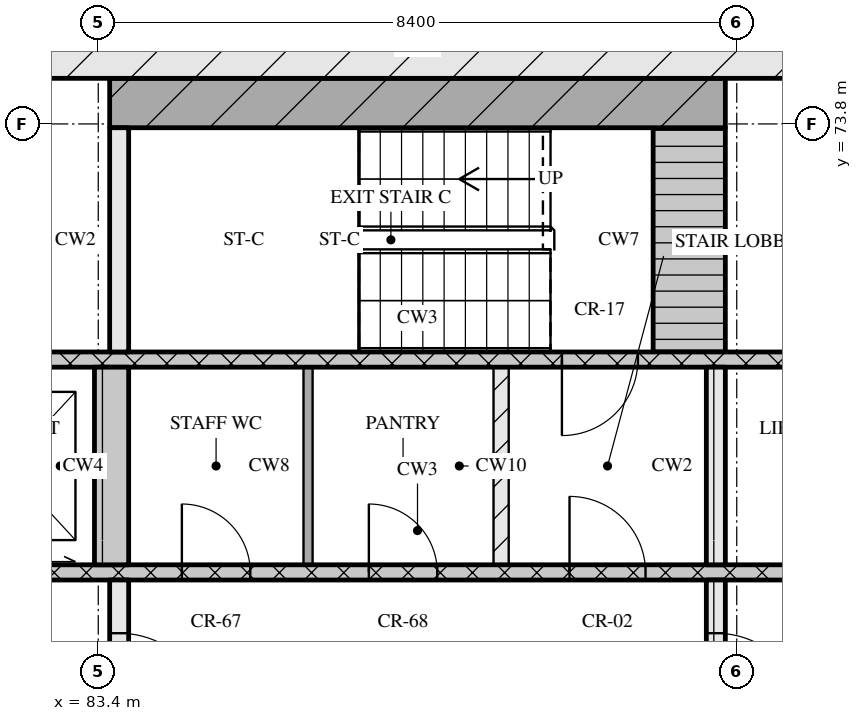
"""IFC4 building model, lengths in metres.
Left out: names, types, materials, properties, quantities, classifications, styles, units other than length and angle.
Written with IfcOpenShell. Run it as: python <this file> out.ifc"""

import sys

from ifc_helpers import new_model, si_unit, direction, frame, frame_2d, origin, place, context, subcontext, project, spatial, rectangle, extrude, element, fill, save


model = new_model("IFC4")
c1 = context("Model", 3, precision=1e-05, world=origin(), true_north=direction((0.0, 1.0)))
c2 = subcontext(c1, "Body", "Model", "MODEL_VIEW")
j1 = project(units=[si_unit("LENGTHUNIT", "METRE"), si_unit("PLANEANGLEUNIT", "RADIAN")], contexts=[c1])
p1 = place(None, origin())
s1 = spatial("IfcSite", under=j1, at=p1, CompositionType="ELEMENT")
p2 = place(p1, origin())
s2 = spatial("IfcBuilding", under=s1, at=p2, CompositionType="ELEMENT")
p3 = place(p2, frame((0.0, 0.0, 69.6)))
s3 = spatial("IfcBuildingStorey", under=s2, at=p3, CompositionType="ELEMENT", Elevation=69.6)
p4 = place(p3, frame((66.6, 75.0, 0.0), z_axis=(0.0, 0.0, 1.0), x_axis=(1.0, 0.0, 0.0)))
e1 = element("IfcWall", 1, at=p4, inside=s3, PredefinedType="SOLIDWALL", context=c2, shape_type="SweptSolid", body=[
    extrude(rectangle(XDim=42.0, YDim=1.2, at=frame_2d((21.0, 0.0))), origin(), (0.0, 0.0, 1.0), 3.32),
])
p5 = place(p3, frame((83.675, 65.2, 0.0), z_axis=(0.0, 0.0, 1.0), x_axis=(0.0, 1.0, 0.0)))
e2 = element("IfcWall", 2, at=p5, inside=s3, PredefinedType="SOLIDWALL", context=c2, shape_type="SweptSolid", body=[
    extrude(rectangle(XDim=2.6, YDim=0.25, at=frame_2d((1.3, 0.0))), origin(), (0.0, 0.0, 1.0), 3.32),
])
p6 = place(p5, frame((0.7, 0.0, 0.0)))
e3 = element("IfcOpeningElement", 3, at=p6, cuts=e2, PredefinedType="OPENING", context=c2, shape_type="SweptSolid", body=[
    extrude(rectangle(XDim=1.2, YDim=2.1, at=frame_2d((0.6, 1.05))), frame((0.0, 0.135, 0.0), z_axis=(0.0, -1.0, 0.0), x_axis=(1.0, 0.0, 0.0)), (0.0, 0.0, 1.0), 0.27),
])
p7 = place(p3, frame((91.525, 65.2, 0.0), z_axis=(0.0, 0.0, 1.0), x_axis=(0.0, 1.0, 0.0)))
e4 = element("IfcWall", 4, at=p7, inside=s3, PredefinedType="SOLIDWALL", context=c2, shape_type="SweptSolid", body=[
    extrude(rectangle(XDim=2.6, YDim=0.25, at=frame_2d((1.3, 0.0))), origin(), (0.0, 0.0, 1.0), 3.32),
])
p8 = place(p7, frame((0.7, 0.0, 0.0)))
e5 = element("IfcOpeningElement", 5, at=p8, cuts=e4, PredefinedType="OPENING", context=c2, shape_type="SweptSolid", body=[
    extrude(rectangle(XDim=1.2, YDim=2.1, at=frame_2d((0.6, 1.05))), frame((0.0, 0.135, 0.0), z_axis=(0.0, -1.0, 0.0), x_axis=(1.0, 0.0, 0.0)), (0.0, 0.0, 1.0), 0.27),
])
p9 = place(p3, frame((76.05, 67.9, 0.0), z_axis=(0.0, 0.0, 1.0), x_axis=(1.0, 0.0, 0.0)))
e6 = element("IfcWall", 6, at=p9, inside=s3, PredefinedType="SOLIDWALL", context=c2, shape_type="SweptSolid", body=[
    extrude(rectangle(XDim=23.1, YDim=0.2, at=frame_2d((11.55, 0.0))), origin(), (0.0, 0.0, 1.0), 3.32),
])
p10 = place(p9, frame((0.6, 0.0, 0.0)))
e7 = element("IfcOpeningElement", 7, at=p10, cuts=e6, PredefinedType="OPENING", context=c2, shape_type="SweptSolid", body=[
    extrude(rectangle(XDim=1.1, YDim=2.1, at=frame_2d((0.55, 1.05))), frame((0.0, 0.11, 0.0), z_axis=(0.0, -1.0, 0.0), x_axis=(1.0, 0.0, 0.0)), (0.0, 0.0, 1.0), 0.22),
])
p11 = place(p9, frame((3.1, 0.0, 0.0)))
e8 = element("IfcOpeningElement", 8, at=p11, cuts=e6, PredefinedType="OPENING", context=c2, shape_type="SweptSolid", body=[
    extrude(rectangle(XDim=1.1, YDim=2.1, at=frame_2d((0.55, 1.05))), frame((0.0, 0.11, 0.0), z_axis=(0.0, -1.0, 0.0), x_axis=(1.0, 0.0, 0.0)), (0.0, 0.0, 1.0), 0.22),
])
p12 = place(p9, frame((5.6, 0.0, 0.0)))
e9 = element("IfcOpeningElement", 9, at=p12, cuts=e6, PredefinedType="OPENING", context=c2, shape_type="SweptSolid", body=[
    extrude(rectangle(XDim=1.1, YDim=2.1, at=frame_2d((0.55, 1.05))), frame((0.0, 0.11, 0.0), z_axis=(0.0, -1.0, 0.0), x_axis=(1.0, 0.0, 0.0)), (0.0, 0.0, 1.0), 0.22),
])
p13 = place(p9, frame((8.45, 0.0, 0.0)))
e10 = element("IfcOpeningElement", 10, at=p13, cuts=e6, PredefinedType="OPENING", context=c2, shape_type="SweptSolid", body=[
    extrude(rectangle(XDim=0.9, YDim=2.1, at=frame_2d((0.45, 1.05))), frame((0.0, 0.11, 0.0), z_axis=(0.0, -1.0, 0.0), x_axis=(1.0, 0.0, 0.0)), (0.0, 0.0, 1.0), 0.22),
])
p14 = place(p9, frame((10.91, 0.0, 0.0)))
e11 = element("IfcOpeningElement", 11, at=p14, cuts=e6, PredefinedType="OPENING", context=c2, shape_type="SweptSolid", body=[
    extrude(rectangle(XDim=0.9, YDim=2.1, at=frame_2d((0.45, 1.05))), frame((0.0, 0.11, 0.0), z_axis=(0.0, -1.0, 0.0), x_axis=(1.0, 0.0, 0.0)), (0.0, 0.0, 1.0), 0.22),
])
p15 = place(p9, frame((13.55, 0.0, 0.0)))
e12 = element("IfcOpeningElement", 12, at=p15, cuts=e6, PredefinedType="OPENING", context=c2, shape_type="SweptSolid", body=[
    extrude(rectangle(XDim=1.0, YDim=2.1, at=frame_2d((0.5, 1.05))), frame((0.0, 0.11, 0.0), z_axis=(0.0, -1.0, 0.0), x_axis=(1.0, 0.0, 0.0)), (0.0, 0.0, 1.0), 0.22),
])
p16 = place(p3, frame((83.575, 68.0, 0.0), z_axis=(0.0, 0.0, 1.0), x_axis=(0.0, 1.0, 0.0)))
e13 = element("IfcWall", 13, at=p16, inside=s3, PredefinedType="SOLIDWALL", context=c2, shape_type="SweptSolid", body=[
    extrude(rectangle(XDim=2.6, YDim=0.45, at=frame_2d((1.3, 0.0))), origin(), (0.0, 0.0, 1.0), 3.32),
])
p17 = place(p3, frame((86.16, 68.0, 0.0), z_axis=(0.0, 0.0, 1.0), x_axis=(0.0, 1.0, 0.0)))
e14 = element("IfcWall", 14, at=p17, inside=s3, PredefinedType="PARTITIONING", context=c2, shape_type="SweptSolid", body=[
    extrude(rectangle(XDim=2.6, YDim=0.12, at=frame_2d((1.3, 0.0))), origin(), (0.0, 0.0, 1.0), 3.32),
])
p18 = place(p3, frame((88.7, 68.0, 0.0), z_axis=(0.0, 0.0, 1.0), x_axis=(0.0, 1.0, 0.0)))
e15 = element("IfcWall", 15, at=p18, inside=s3, PredefinedType="PARTITIONING", context=c2, shape_type="SweptSolid", body=[
    extrude(rectangle(XDim=2.6, YDim=0.2, at=frame_2d((1.3, 0.0))), origin(), (0.0, 0.0, 1.0), 3.32),
])
p19 = place(p3, frame((91.525, 68.0, 0.0), z_axis=(0.0, 0.0, 1.0), x_axis=(0.0, 1.0, 0.0)))
e16 = element("IfcWall", 16, at=p19, inside=s3, PredefinedType="SOLIDWALL", context=c2, shape_type="SweptSolid", body=[
    extrude(rectangle(XDim=2.6, YDim=0.25, at=frame_2d((1.3, 0.0))), origin(), (0.0, 0.0, 1.0), 3.32),
])
p20 = place(p3, frame((67.8, 70.7, 0.0), z_axis=(0.0, 0.0, 1.0), x_axis=(1.0, 0.0, 0.0)))
e17 = element("IfcWall", 17, at=p20, inside=s3, PredefinedType="SOLIDWALL", context=c2, shape_type="SweptSolid", body=[
    extrude(rectangle(XDim=39.6, YDim=0.2, at=frame_2d((19.8, 0.0))), origin(), (0.0, 0.0, 1.0), 3.32),
])
p21 = place(p20, frame((0.65, 0.0, 0.0)))
e18 = element("IfcOpeningElement", 18, at=p21, cuts=e17, PredefinedType="OPENING", context=c2, shape_type="SweptSolid", body=[
    extrude(rectangle(XDim=1.1, YDim=2.1, at=frame_2d((0.55, 1.05))), frame((0.0, 0.11, 0.0), z_axis=(0.0, -1.0, 0.0), x_axis=(1.0, 0.0, 0.0)), (0.0, 0.0, 1.0), 0.22),
])
p22 = place(p20, frame((3.25, 0.0, 0.0)))
e19 = element("IfcOpeningElement", 19, at=p22, cuts=e17, PredefinedType="OPENING", context=c2, shape_type="SweptSolid", body=[
    extrude(rectangle(XDim=1.1, YDim=2.1, at=frame_2d((0.55, 1.05))), frame((0.0, 0.11, 0.0), z_axis=(0.0, -1.0, 0.0), x_axis=(1.0, 0.0, 0.0)), (0.0, 0.0, 1.0), 0.22),
])
p23 = place(p20, frame((5.9, 0.0, 0.0)))
e20 = element("IfcOpeningElement", 20, at=p23, cuts=e17, PredefinedType="OPENING", context=c2, shape_type="SweptSolid", body=[
    extrude(rectangle(XDim=1.0, YDim=2.1, at=frame_2d((0.5, 1.05))), frame((0.0, 0.11, 0.0), z_axis=(0.0, -1.0, 0.0), x_axis=(1.0, 0.0, 0.0)), (0.0, 0.0, 1.0), 0.22),
])
p24 = place(p20, frame((21.7, 0.0, 0.0)))
e21 = element("IfcOpeningElement", 21, at=p24, cuts=e17, PredefinedType="OPENING", context=c2, shape_type="SweptSolid", body=[
    extrude(rectangle(XDim=1.0, YDim=2.1, at=frame_2d((0.5, 1.05))), frame((0.0, 0.11, 0.0), z_axis=(0.0, -1.0, 0.0), x_axis=(1.0, 0.0, 0.0)), (0.0, 0.0, 1.0), 0.22),
])
p25 = place(p20, frame((32.7, 0.0, 0.0)))
e22 = element("IfcOpeningElement", 22, at=p25, cuts=e17, PredefinedType="OPENING", context=c2, shape_type="SweptSolid", body=[
    extrude(rectangle(XDim=1.0, YDim=2.1, at=frame_2d((0.5, 1.05))), frame((0.0, 0.11, 0.0), z_axis=(0.0, -1.0, 0.0), x_axis=(1.0, 0.0, 0.0)), (0.0, 0.0, 1.0), 0.22),
])
p26 = place(p20, frame((35.25, 0.0, 0.0)))
e23 = element("IfcOpeningElement", 23, at=p26, cuts=e17, PredefinedType="OPENING", context=c2, shape_type="SweptSolid", body=[
    extrude(rectangle(XDim=1.1, YDim=2.1, at=frame_2d((0.55, 1.05))), frame((0.0, 0.11, 0.0), z_axis=(0.0, -1.0, 0.0), x_axis=(1.0, 0.0, 0.0)), (0.0, 0.0, 1.0), 0.22),
])
p27 = place(p20, frame((37.85, 0.0, 0.0)))
e24 = element("IfcOpeningElement", 24, at=p27, cuts=e17, PredefinedType="OPENING", context=c2, shape_type="SweptSolid", body=[
    extrude(rectangle(XDim=1.1, YDim=2.1, at=frame_2d((0.55, 1.05))), frame((0.0, 0.11, 0.0), z_axis=(0.0, -1.0, 0.0), x_axis=(1.0, 0.0, 0.0)), (0.0, 0.0, 1.0), 0.22),
])
p28 = place(p3, frame((83.675, 70.8, 0.0), z_axis=(0.0, 0.0, 1.0), x_axis=(0.0, 1.0, 0.0)))
e25 = element("IfcWall", 25, at=p28, inside=s3, PredefinedType="SOLIDWALL", context=c2, shape_type="SweptSolid", body=[
    extrude(rectangle(XDim=2.95, YDim=0.25, at=frame_2d((1.475, 0.0))), origin(), (0.0, 0.0, 1.0), 3.32),
])
p29 = place(p3, frame((91.175, 70.8, 0.0), z_axis=(0.0, 0.0, 1.0), x_axis=(0.0, 1.0, 0.0)))
e26 = element("IfcWall", 26, at=p29, inside=s3, PredefinedType="SOLIDWALL", context=c2, shape_type="SweptSolid", body=[
    extrude(rectangle(XDim=2.95, YDim=0.95, at=frame_2d((1.475, 0.0))), origin(), (0.0, 0.0, 1.0), 3.32),
])
p30 = place(p3, frame((83.55, 74.075, 0.0), z_axis=(0.0, 0.0, 1.0), x_axis=(1.0, 0.0, 0.0)))
e27 = element("IfcWall", 27, at=p30, inside=s3, PredefinedType="SOLIDWALL", context=c2, shape_type="SweptSolid", body=[
    extrude(rectangle(XDim=8.1, YDim=0.65, at=frame_2d((4.05, 0.0))), origin(), (0.0, 0.0, 1.0), 3.32),
])
p31 = place(p6, origin())
e28 = element("IfcDoor", 28, at=p31, inside=s3, OperationType="SINGLE_SWING_RIGHT", PredefinedType="DOOR", context=c2, shape_type="SweptSolid", body=[
    extrude(rectangle(XDim=1.2, YDim=2.1, at=frame_2d((0.6, 1.05))), frame((0.0, 0.025, 0.0), z_axis=(0.0, -1.0, 0.0), x_axis=(1.0, 0.0, 0.0)), (0.0, 0.0, 1.0), 0.05),
])
fill(e3, e28)
p32 = place(p8, origin())
e29 = element("IfcDoor", 29, at=p32, inside=s3, OperationType="SINGLE_SWING_RIGHT", PredefinedType="DOOR", context=c2, shape_type="SweptSolid", body=[
    extrude(rectangle(XDim=1.2, YDim=2.1, at=frame_2d((0.6, 1.05))), frame((0.0, 0.025, 0.0), z_axis=(0.0, -1.0, 0.0), x_axis=(1.0, 0.0, 0.0)), (0.0, 0.0, 1.0), 0.05),
])
fill(e5, e29)
p33 = place(p13, origin())
e30 = element("IfcDoor", 30, at=p33, inside=s3, OperationType="SINGLE_SWING_LEFT", PredefinedType="DOOR", context=c2, shape_type="SweptSolid", body=[
    extrude(rectangle(XDim=0.9, YDim=2.1, at=frame_2d((0.45, 1.05))), frame((0.0, 0.025, 0.0), z_axis=(0.0, -1.0, 0.0), x_axis=(1.0, 0.0, 0.0)), (0.0, 0.0, 1.0), 0.05),
])
fill(e10, e30)
p34 = place(p14, origin())
e31 = element("IfcDoor", 31, at=p34, inside=s3, OperationType="SINGLE_SWING_LEFT", PredefinedType="DOOR", context=c2, shape_type="SweptSolid", body=[
    extrude(rectangle(XDim=0.9, YDim=2.1, at=frame_2d((0.45, 1.05))), frame((0.0, 0.025, 0.0), z_axis=(0.0, -1.0, 0.0), x_axis=(1.0, 0.0, 0.0)), (0.0, 0.0, 1.0), 0.05),
])
fill(e11, e31)
p35 = place(p15, origin())
e32 = element("IfcDoor", 32, at=p35, inside=s3, OperationType="SINGLE_SWING_LEFT", PredefinedType="DOOR", context=c2, shape_type="SweptSolid", body=[
    extrude(rectangle(XDim=1.0, YDim=2.1, at=frame_2d((0.5, 1.05))), frame((0.0, 0.025, 0.0), z_axis=(0.0, -1.0, 0.0), x_axis=(1.0, 0.0, 0.0)), (0.0, 0.0, 1.0), 0.05),
])
fill(e12, e32)
p36 = place(p24, origin())
e33 = element("IfcDoor", 33, at=p36, inside=s3, OperationType="SINGLE_SWING_RIGHT", PredefinedType="DOOR", context=c2, shape_type="SweptSolid", body=[
    extrude(rectangle(XDim=1.0, YDim=2.1, at=frame_2d((0.5, 1.05))), frame((0.0, 0.025, 0.0), z_axis=(0.0, -1.0, 0.0), x_axis=(1.0, 0.0, 0.0)), (0.0, 0.0, 1.0), 0.05),
])
fill(e21, e33)
save(model, sys.argv[1])
